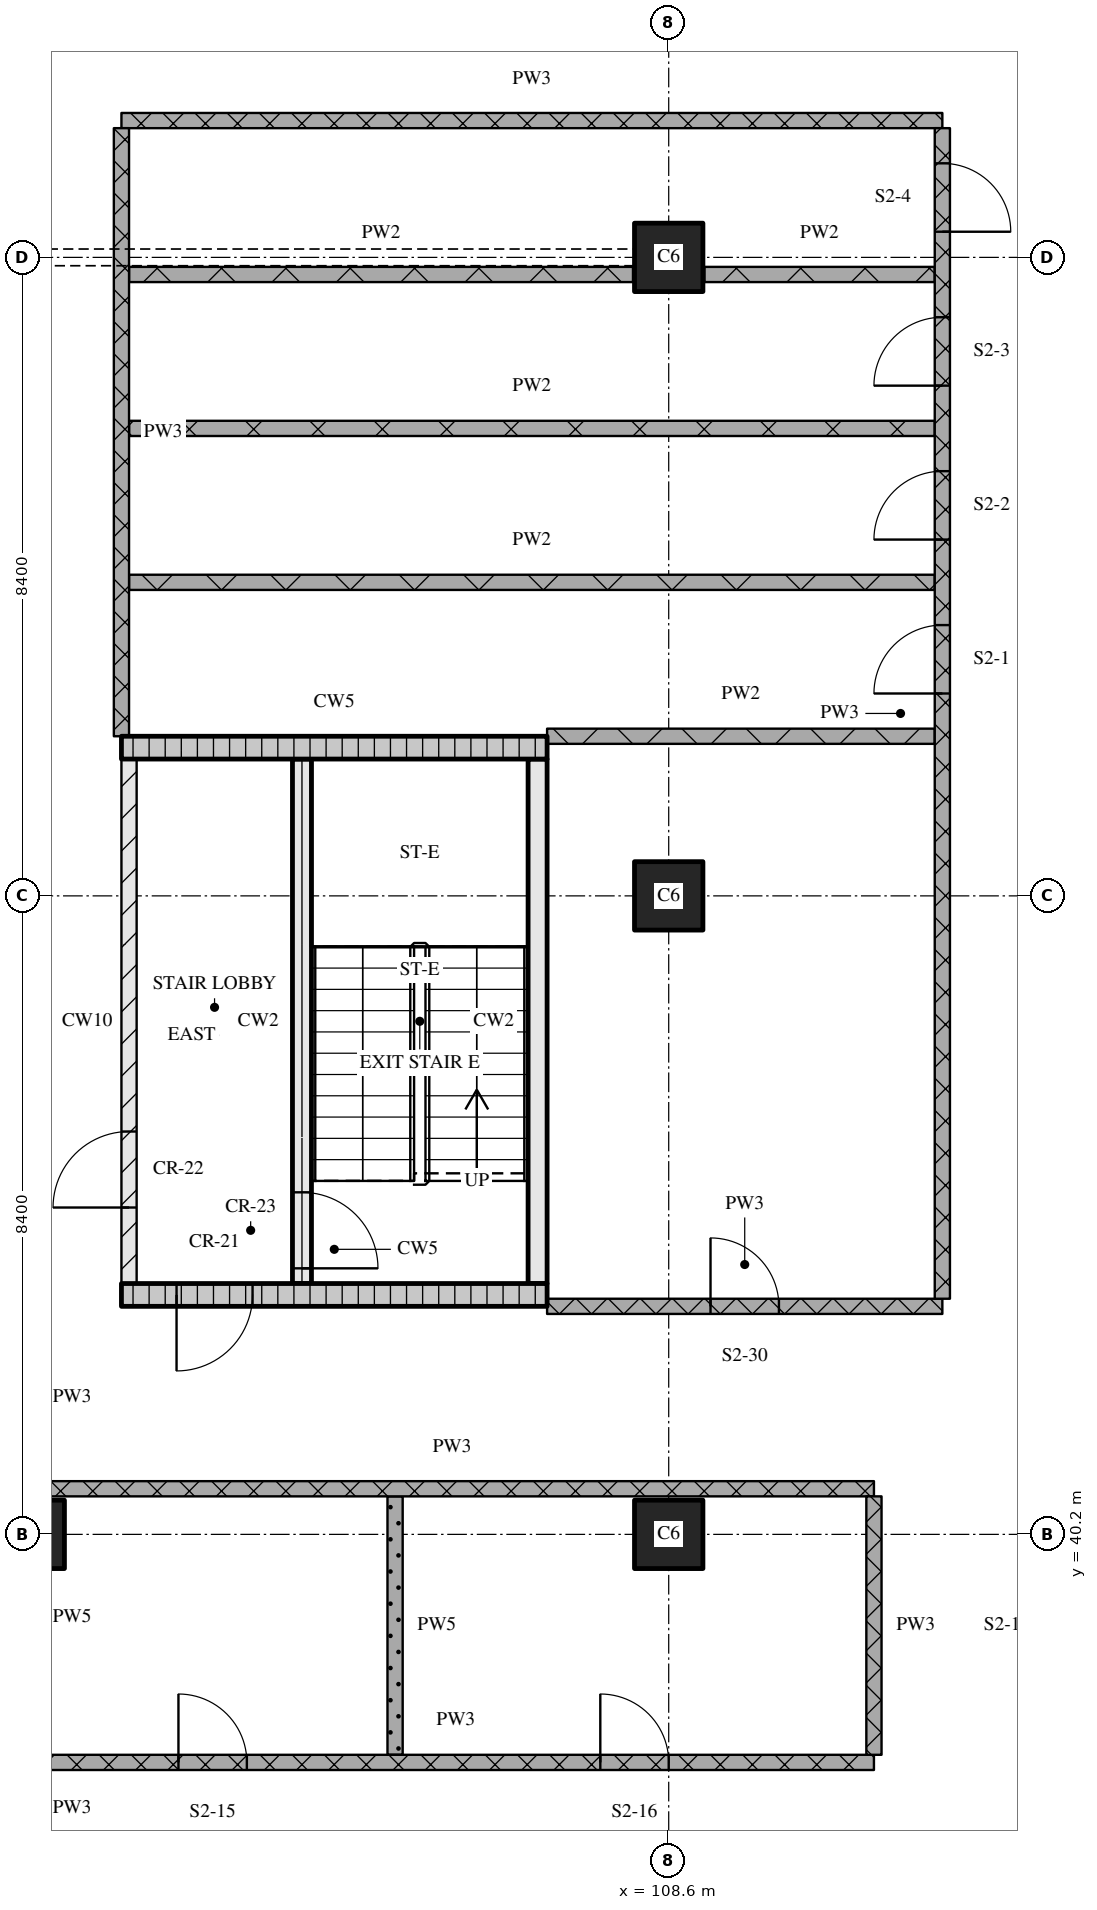
"""IFC4 building model, lengths in metres.
Left out: names, types, materials, properties, quantities, classifications, styles, units other than length and angle.
Written with IfcOpenShell. Run it as: python <this file> out.ifc"""

import sys

from ifc_helpers import new_model, si_unit, direction, frame, frame_2d, origin, origin_2d, place, context, subcontext, project, spatial, rectangle, extrude, element, fill, save


model = new_model("IFC4")
c1 = context("Model", 3, precision=1e-05, world=origin(), true_north=direction((0.0, 1.0)))
c2 = subcontext(c1, "Body", "Model", "MODEL_VIEW")
j1 = project(units=[si_unit("LENGTHUNIT", "METRE"), si_unit("PLANEANGLEUNIT", "RADIAN")], contexts=[c1])
p1 = place(None, origin())
s1 = spatial("IfcSite", under=j1, at=p1, CompositionType="ELEMENT")
p2 = place(p1, origin())
s2 = spatial("IfcBuilding", under=s1, at=p2, CompositionType="ELEMENT")
p3 = place(p2, frame((0.0, 0.0, 32.7)))
s3 = spatial("IfcBuildingStorey", under=s2, at=p3, CompositionType="ELEMENT", Elevation=32.7)
for number, where, z_axis, x_axis in (
    (1, (100.2, 40.2, 0.0), (0.0, 0.0, 1.0), (1.0, 0.0, 0.0)),
    (2, (108.6, 40.2, 0.0), (0.0, 0.0, 1.0), (1.0, 0.0, 0.0)),
    (3, (108.6, 48.6, 0.0), (0.0, 0.0, 1.0), (1.0, 0.0, 0.0)),
    (4, (108.6, 57.0, 0.0), (0.0, 0.0, 1.0), (1.0, 0.0, 0.0)),
):
    element("IfcColumn", number, at=place(p3, frame(where, z_axis=z_axis, x_axis=x_axis)), inside=s3, PredefinedType="COLUMN", context=c2, shape_type="SweptSolid", body=[
        extrude(rectangle(XDim=0.9, YDim=0.9, at=origin_2d()), origin(), (0.0, 0.0, 1.0), 4.5),
    ])
p4 = place(p3, frame((101.4, 43.35, 0.0), z_axis=(0.0, 0.0, 1.0), x_axis=(1.0, 0.0, 0.0)))
e5 = element("IfcWall", 5, at=p4, inside=s3, PredefinedType="SOLIDWALL", context=c2, shape_type="SweptSolid", body=[
    extrude(rectangle(XDim=5.6, YDim=0.3, at=frame_2d((2.8, 0.0))), origin(), (0.0, 0.0, 1.0), 4.22),
])
p5 = place(p4, frame((0.725, 0.0, 0.0)))
e6 = element("IfcOpeningElement", 6, at=p5, cuts=e5, PredefinedType="OPENING", context=c2, shape_type="SweptSolid", body=[
    extrude(rectangle(XDim=1.0, YDim=2.1, at=frame_2d((0.5, 1.05))), frame((0.0, 0.16, 0.0), z_axis=(0.0, -1.0, 0.0), x_axis=(1.0, 0.0, 0.0)), (0.0, 0.0, 1.0), 0.32),
])
p6 = place(p3, frame((101.5, 43.5, 0.0), z_axis=(0.0, 0.0, 1.0), x_axis=(0.0, 1.0, 0.0)))
e7 = element("IfcWall", 7, at=p6, inside=s3, PredefinedType="PARTITIONING", context=c2, shape_type="SweptSolid", body=[
    extrude(rectangle(XDim=6.9, YDim=0.2, at=frame_2d((3.45, 0.0))), origin(), (0.0, 0.0, 1.0), 4.22),
])
p7 = place(p6, frame((1.0, 0.0, 0.0)))
e8 = element("IfcOpeningElement", 8, at=p7, cuts=e7, PredefinedType="OPENING", context=c2, shape_type="SweptSolid", body=[
    extrude(rectangle(XDim=1.0, YDim=2.1, at=frame_2d((0.5, 1.05))), frame((0.0, 0.11, 0.0), z_axis=(0.0, -1.0, 0.0), x_axis=(1.0, 0.0, 0.0)), (0.0, 0.0, 1.0), 0.22),
])
p8 = place(p3, frame((103.775, 43.5, 0.0), z_axis=(0.0, 0.0, 1.0), x_axis=(0.0, 1.0, 0.0)))
e9 = element("IfcWall", 9, at=p8, inside=s3, PredefinedType="SOLIDWALL", context=c2, shape_type="SweptSolid", body=[
    extrude(rectangle(XDim=6.9, YDim=0.25, at=frame_2d((3.45, 0.0))), origin(), (0.0, 0.0, 1.0), 4.22),
])
p9 = place(p8, frame((0.2, 0.0, 0.0)))
e10 = element("IfcOpeningElement", 10, at=p9, cuts=e9, PredefinedType="OPENING", context=c2, shape_type="SweptSolid", body=[
    extrude(rectangle(XDim=1.0, YDim=2.1, at=frame_2d((0.5, 1.05))), frame((0.0, 0.135, 0.0), z_axis=(0.0, -1.0, 0.0), x_axis=(1.0, 0.0, 0.0)), (0.0, 0.0, 1.0), 0.27),
])
p10 = place(p3, frame((106.875, 43.5, 0.0), z_axis=(0.0, 0.0, 1.0), x_axis=(0.0, 1.0, 0.0)))
e11 = element("IfcWall", 11, at=p10, inside=s3, PredefinedType="SOLIDWALL", context=c2, shape_type="SweptSolid", body=[
    extrude(rectangle(XDim=6.9, YDim=0.25, at=frame_2d((3.45, 0.0))), origin(), (0.0, 0.0, 1.0), 4.22),
])
p11 = place(p3, frame((101.4, 50.55, 0.0), z_axis=(0.0, 0.0, 1.0), x_axis=(1.0, 0.0, 0.0)))
e12 = element("IfcWall", 12, at=p11, inside=s3, PredefinedType="SOLIDWALL", context=c2, shape_type="SweptSolid", body=[
    extrude(rectangle(XDim=5.6, YDim=0.3, at=frame_2d((2.8, 0.0))), origin(), (0.0, 0.0, 1.0), 4.22),
])
p12 = place(p3, frame((100.3, 37.2, 0.0), z_axis=(0.0, 0.0, 1.0), x_axis=(1.0, 0.0, 0.0)))
e13 = element("IfcWall", 13, at=p12, inside=s3, PredefinedType="PARTITIONING", context=c2, shape_type="SweptSolid", body=[
    extrude(rectangle(XDim=11.0, YDim=0.2, at=frame_2d((5.5, 0.0))), origin(), (0.0, 0.0, 1.0), 4.22),
])
p13 = place(p12, frame((1.85, 0.0, 0.0)))
e14 = element("IfcOpeningElement", 14, at=p13, cuts=e13, PredefinedType="OPENING", context=c2, shape_type="SweptSolid", body=[
    extrude(rectangle(XDim=0.9, YDim=2.1, at=frame_2d((0.45, 1.05))), frame((0.0, 0.11, 0.0), z_axis=(0.0, -1.0, 0.0), x_axis=(1.0, 0.0, 0.0)), (0.0, 0.0, 1.0), 0.22),
])
p14 = place(p12, frame((7.4, 0.0, 0.0)))
e15 = element("IfcOpeningElement", 15, at=p14, cuts=e13, PredefinedType="OPENING", context=c2, shape_type="SweptSolid", body=[
    extrude(rectangle(XDim=0.9, YDim=2.1, at=frame_2d((0.45, 1.05))), frame((0.0, 0.11, 0.0), z_axis=(0.0, -1.0, 0.0), x_axis=(1.0, 0.0, 0.0)), (0.0, 0.0, 1.0), 0.22),
])
p15 = place(p3, frame((100.2, 40.8, 0.0), z_axis=(0.0, 0.0, 1.0), x_axis=(1.0, 0.0, 0.0)))
e16 = element("IfcWall", 16, at=p15, inside=s3, PredefinedType="PARTITIONING", context=c2, shape_type="SweptSolid", body=[
    extrude(rectangle(XDim=11.1, YDim=0.2, at=frame_2d((5.55, 0.0))), origin(), (0.0, 0.0, 1.0), 4.22),
])
p16 = place(p3, frame((107.0, 43.2, 0.0), z_axis=(0.0, 0.0, 1.0), x_axis=(1.0, 0.0, 0.0)))
e17 = element("IfcWall", 17, at=p16, inside=s3, PredefinedType="PARTITIONING", context=c2, shape_type="SweptSolid", body=[
    extrude(rectangle(XDim=5.2, YDim=0.2, at=frame_2d((2.6, 0.0))), origin(), (0.0, 0.0, 1.0), 4.22),
])
p17 = place(p16, frame((2.15, 0.0, 0.0)))
e18 = element("IfcOpeningElement", 18, at=p17, cuts=e17, PredefinedType="OPENING", context=c2, shape_type="SweptSolid", body=[
    extrude(rectangle(XDim=0.9, YDim=2.1, at=frame_2d((0.45, 1.05))), frame((0.0, 0.11, 0.0), z_axis=(0.0, -1.0, 0.0), x_axis=(1.0, 0.0, 0.0)), (0.0, 0.0, 1.0), 0.22),
])
p18 = place(p3, frame((107.0, 50.7, 0.0), z_axis=(0.0, 0.0, 1.0), x_axis=(1.0, 0.0, 0.0)))
e19 = element("IfcWall", 19, at=p18, inside=s3, PredefinedType="PARTITIONING", context=c2, shape_type="SweptSolid", body=[
    extrude(rectangle(XDim=5.1, YDim=0.2, at=frame_2d((2.55, 0.0))), origin(), (0.0, 0.0, 1.0), 4.22),
])
for number, where, z_axis, x_axis in (
    (20, (101.5, 52.725, 0.0), (0.0, 0.0, 1.0), (1.0, 0.0, 0.0)),
    (21, (101.5, 54.75, 0.0), (0.0, 0.0, 1.0), (1.0, 0.0, 0.0)),
):
    element("IfcWall", number, at=place(p3, frame(where, z_axis=z_axis, x_axis=x_axis)), inside=s3, PredefinedType="PARTITIONING", context=c2, shape_type="SweptSolid", body=[
        extrude(rectangle(XDim=10.6, YDim=0.2, at=frame_2d((5.3, 0.0))), origin(), (0.0, 0.0, 1.0), 4.22),
    ])
p19 = place(p3, frame((101.5, 56.775, 0.0), z_axis=(0.0, 0.0, 1.0), x_axis=(1.0, 0.0, 0.0)))
e22 = element("IfcWall", 22, at=p19, inside=s3, PredefinedType="PARTITIONING", context=c2, shape_type="SweptSolid", body=[
    extrude(rectangle(XDim=6.63, YDim=0.2, at=frame_2d((3.315, 0.0))), origin(), (0.0, 0.0, 1.0), 4.22),
])
p20 = place(p3, frame((109.07, 56.775, 0.0), z_axis=(0.0, 0.0, 1.0), x_axis=(1.0, 0.0, 0.0)))
e23 = element("IfcWall", 23, at=p20, inside=s3, PredefinedType="PARTITIONING", context=c2, shape_type="SweptSolid", body=[
    extrude(rectangle(XDim=3.03, YDim=0.2, at=frame_2d((1.515, 0.0))), origin(), (0.0, 0.0, 1.0), 4.22),
])
p21 = place(p3, frame((101.4, 58.8, 0.0), z_axis=(0.0, 0.0, 1.0), x_axis=(1.0, 0.0, 0.0)))
e24 = element("IfcWall", 24, at=p21, inside=s3, PredefinedType="PARTITIONING", context=c2, shape_type="SweptSolid", body=[
    extrude(rectangle(XDim=10.8, YDim=0.2, at=frame_2d((5.4, 0.0))), origin(), (0.0, 0.0, 1.0), 4.22),
])
p22 = place(p3, frame((101.4, 58.7, 0.0), z_axis=(0.0, 0.0, 1.0), x_axis=(0.0, -1.0, 0.0)))
e25 = element("IfcWall", 25, at=p22, inside=s3, PredefinedType="PARTITIONING", context=c2, shape_type="SweptSolid", body=[
    extrude(rectangle(XDim=8.0, YDim=0.2, at=frame_2d((4.0, 0.0))), origin(), (0.0, 0.0, 1.0), 4.22),
])
for number, where, z_axis, x_axis in (
    (26, (105.0, 40.7, 0.0), (0.0, 0.0, 1.0), (0.0, -1.0, 0.0)),
    (27, (111.3, 40.7, 0.0), (0.0, 0.0, 1.0), (0.0, -1.0, 0.0)),
):
    element("IfcWall", number, at=place(p3, frame(where, z_axis=z_axis, x_axis=x_axis)), inside=s3, PredefinedType="PARTITIONING", context=c2, shape_type="SweptSolid", body=[
        extrude(rectangle(XDim=3.4, YDim=0.2, at=frame_2d((1.7, 0.0))), origin(), (0.0, 0.0, 1.0), 4.22),
    ])
p23 = place(p3, frame((112.2, 43.3, 0.0), z_axis=(0.0, 0.0, 1.0), x_axis=(0.0, 1.0, 0.0)))
e28 = element("IfcWall", 28, at=p23, inside=s3, PredefinedType="PARTITIONING", context=c2, shape_type="SweptSolid", body=[
    extrude(rectangle(XDim=15.4, YDim=0.2, at=frame_2d((7.7, 0.0))), origin(), (0.0, 0.0, 1.0), 4.22),
])
p24 = place(p23, frame((7.962, 0.0, 0.0)))
e29 = element("IfcOpeningElement", 29, at=p24, cuts=e28, PredefinedType="OPENING", context=c2, shape_type="SweptSolid", body=[
    extrude(rectangle(XDim=0.9, YDim=2.1, at=frame_2d((0.45, 1.05))), frame((0.0, 0.11, 0.0), z_axis=(0.0, -1.0, 0.0), x_axis=(1.0, 0.0, 0.0)), (0.0, 0.0, 1.0), 0.22),
])
p25 = place(p23, frame((9.988, 0.0, 0.0)))
e30 = element("IfcOpeningElement", 30, at=p25, cuts=e28, PredefinedType="OPENING", context=c2, shape_type="SweptSolid", body=[
    extrude(rectangle(XDim=0.9, YDim=2.1, at=frame_2d((0.45, 1.05))), frame((0.0, 0.11, 0.0), z_axis=(0.0, -1.0, 0.0), x_axis=(1.0, 0.0, 0.0)), (0.0, 0.0, 1.0), 0.22),
])
p26 = place(p23, frame((12.012, 0.0, 0.0)))
e31 = element("IfcOpeningElement", 31, at=p26, cuts=e28, PredefinedType="OPENING", context=c2, shape_type="SweptSolid", body=[
    extrude(rectangle(XDim=0.9, YDim=2.1, at=frame_2d((0.45, 1.05))), frame((0.0, 0.11, 0.0), z_axis=(0.0, -1.0, 0.0), x_axis=(1.0, 0.0, 0.0)), (0.0, 0.0, 1.0), 0.22),
])
p27 = place(p23, frame((14.038, 0.0, 0.0)))
e32 = element("IfcOpeningElement", 32, at=p27, cuts=e28, PredefinedType="OPENING", context=c2, shape_type="SweptSolid", body=[
    extrude(rectangle(XDim=0.9, YDim=2.1, at=frame_2d((0.45, 1.05))), frame((0.0, 0.11, 0.0), z_axis=(0.0, -1.0, 0.0), x_axis=(1.0, 0.0, 0.0)), (0.0, 0.0, 1.0), 0.22),
])
p28 = place(p5, origin())
e33 = element("IfcDoor", 33, at=p28, inside=s3, OperationType="SINGLE_SWING_RIGHT", PredefinedType="DOOR", context=c2, shape_type="SweptSolid", body=[
    extrude(rectangle(XDim=1.0, YDim=2.1, at=frame_2d((0.5, 1.05))), frame((0.0, 0.025, 0.0), z_axis=(0.0, -1.0, 0.0), x_axis=(1.0, 0.0, 0.0)), (0.0, 0.0, 1.0), 0.05),
])
fill(e6, e33)
p29 = place(p9, origin())
e34 = element("IfcDoor", 34, at=p29, inside=s3, OperationType="SINGLE_SWING_RIGHT", PredefinedType="DOOR", context=c2, shape_type="SweptSolid", body=[
    extrude(rectangle(XDim=1.0, YDim=2.1, at=frame_2d((0.5, 1.05))), frame((0.0, 0.025, 0.0), z_axis=(0.0, -1.0, 0.0), x_axis=(1.0, 0.0, 0.0)), (0.0, 0.0, 1.0), 0.05),
])
fill(e10, e34)
p30 = place(p7, origin())
e35 = element("IfcDoor", 35, at=p30, inside=s3, OperationType="SINGLE_SWING_LEFT", PredefinedType="DOOR", context=c2, shape_type="SweptSolid", body=[
    extrude(rectangle(XDim=1.0, YDim=2.1, at=frame_2d((0.5, 1.05))), frame((0.0, 0.025, 0.0), z_axis=(0.0, -1.0, 0.0), x_axis=(1.0, 0.0, 0.0)), (0.0, 0.0, 1.0), 0.05),
])
fill(e8, e35)
p31 = place(p13, origin())
e36 = element("IfcDoor", 36, at=p31, inside=s3, OperationType="SINGLE_SWING_LEFT", PredefinedType="DOOR", context=c2, shape_type="SweptSolid", body=[
    extrude(rectangle(XDim=0.9, YDim=2.1, at=frame_2d((0.45, 1.05))), frame((0.0, 0.025, 0.0), z_axis=(0.0, -1.0, 0.0), x_axis=(1.0, 0.0, 0.0)), (0.0, 0.0, 1.0), 0.05),
])
fill(e14, e36)
p32 = place(p14, origin())
e37 = element("IfcDoor", 37, at=p32, inside=s3, OperationType="SINGLE_SWING_LEFT", PredefinedType="DOOR", context=c2, shape_type="SweptSolid", body=[
    extrude(rectangle(XDim=0.9, YDim=2.1, at=frame_2d((0.45, 1.05))), frame((0.0, 0.025, 0.0), z_axis=(0.0, -1.0, 0.0), x_axis=(1.0, 0.0, 0.0)), (0.0, 0.0, 1.0), 0.05),
])
fill(e15, e37)
p33 = place(p17, origin())
e38 = element("IfcDoor", 38, at=p33, inside=s3, OperationType="SINGLE_SWING_LEFT", PredefinedType="DOOR", context=c2, shape_type="SweptSolid", body=[
    extrude(rectangle(XDim=0.9, YDim=2.1, at=frame_2d((0.45, 1.05))), frame((0.0, 0.025, 0.0), z_axis=(0.0, -1.0, 0.0), x_axis=(1.0, 0.0, 0.0)), (0.0, 0.0, 1.0), 0.05),
])
fill(e18, e38)
p34 = place(p24, origin())
e39 = element("IfcDoor", 39, at=p34, inside=s3, OperationType="SINGLE_SWING_LEFT", PredefinedType="DOOR", context=c2, shape_type="SweptSolid", body=[
    extrude(rectangle(XDim=0.9, YDim=2.1, at=frame_2d((0.45, 1.05))), frame((0.0, 0.025, 0.0), z_axis=(0.0, -1.0, 0.0), x_axis=(1.0, 0.0, 0.0)), (0.0, 0.0, 1.0), 0.05),
])
fill(e29, e39)
p35 = place(p25, origin())
e40 = element("IfcDoor", 40, at=p35, inside=s3, OperationType="SINGLE_SWING_LEFT", PredefinedType="DOOR", context=c2, shape_type="SweptSolid", body=[
    extrude(rectangle(XDim=0.9, YDim=2.1, at=frame_2d((0.45, 1.05))), frame((0.0, 0.025, 0.0), z_axis=(0.0, -1.0, 0.0), x_axis=(1.0, 0.0, 0.0)), (0.0, 0.0, 1.0), 0.05),
])
fill(e30, e40)
p36 = place(p26, origin())
e41 = element("IfcDoor", 41, at=p36, inside=s3, OperationType="SINGLE_SWING_LEFT", PredefinedType="DOOR", context=c2, shape_type="SweptSolid", body=[
    extrude(rectangle(XDim=0.9, YDim=2.1, at=frame_2d((0.45, 1.05))), frame((0.0, 0.025, 0.0), z_axis=(0.0, -1.0, 0.0), x_axis=(1.0, 0.0, 0.0)), (0.0, 0.0, 1.0), 0.05),
])
fill(e31, e41)
p37 = place(p27, origin())
e42 = element("IfcDoor", 42, at=p37, inside=s3, OperationType="SINGLE_SWING_RIGHT", PredefinedType="DOOR", context=c2, shape_type="SweptSolid", body=[
    extrude(rectangle(XDim=0.9, YDim=2.1, at=frame_2d((0.45, 1.05))), frame((0.0, 0.025, 0.0), z_axis=(0.0, -1.0, 0.0), x_axis=(1.0, 0.0, 0.0)), (0.0, 0.0, 1.0), 0.05),
])
fill(e32, e42)
save(model, sys.argv[1])
